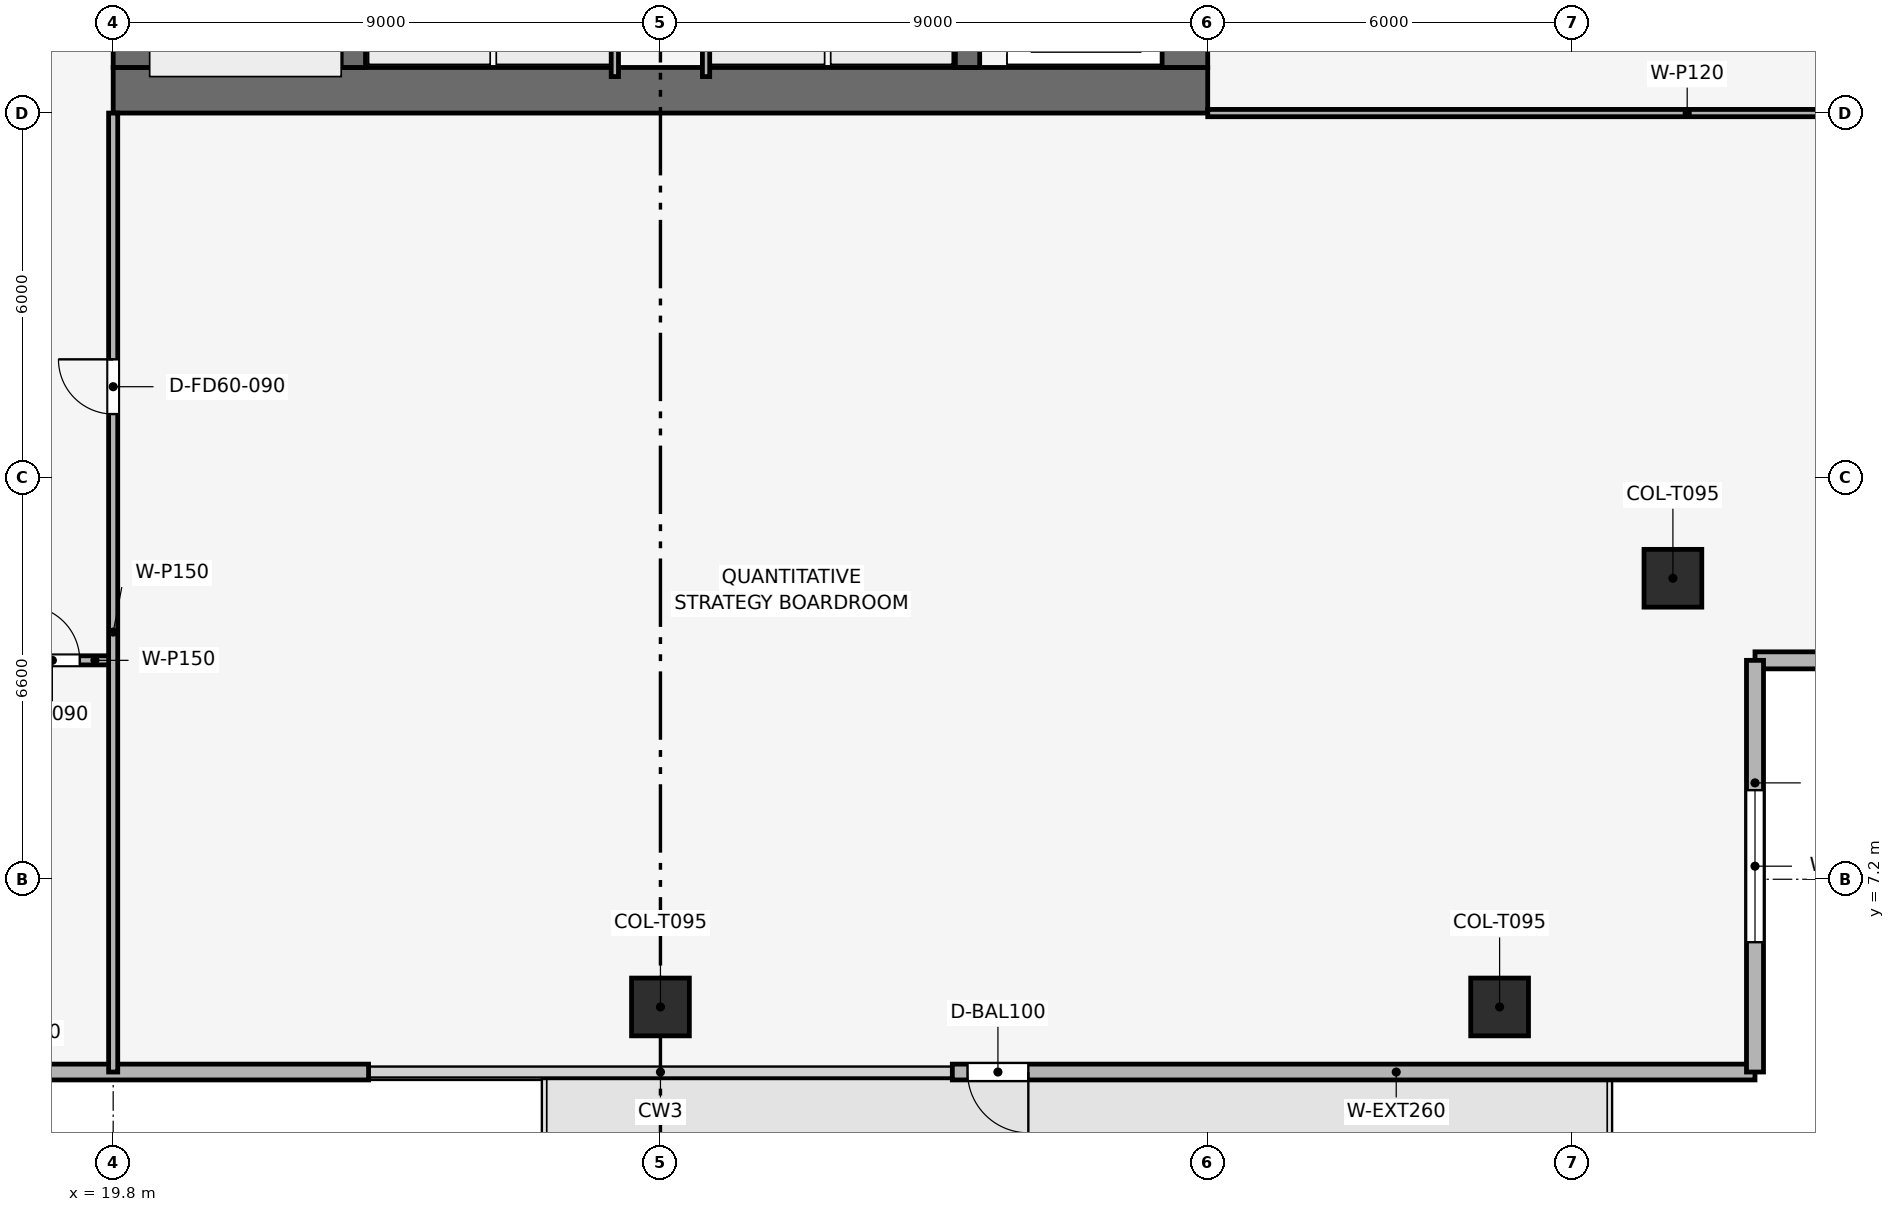
"""IFC4 building model, lengths in metres.
Left out: names, types, materials, properties, quantities, classifications, styles, units other than length and angle.
Written with IfcOpenShell. Run it as: python <this file> out.ifc"""

import sys

from ifc_helpers import new_model, si_unit, direction, frame, frame_2d, origin, origin_2d, place, context, subcontext, project, spatial, rectangle, extrude, element, fill, save


model = new_model("IFC4")
c1 = context("Model", 3, precision=1e-05, world=origin(), true_north=direction((0.0, 1.0)))
c2 = subcontext(c1, "Body", "Model", "MODEL_VIEW")
j1 = project(units=[si_unit("LENGTHUNIT", "METRE"), si_unit("PLANEANGLEUNIT", "RADIAN")], contexts=[c1])
p1 = place(None, origin())
s1 = spatial("IfcSite", under=j1, at=p1, CompositionType="ELEMENT")
p2 = place(p1, origin())
s2 = spatial("IfcBuilding", under=s1, at=p2, CompositionType="ELEMENT")
p3 = place(p2, frame((0.0, 0.0, 261.6)))
s3 = spatial("IfcBuildingStorey", under=s2, at=p3, CompositionType="ELEMENT", Elevation=261.6)
p4 = place(p3, frame((19.8, 20.175, 0.0), z_axis=(0.0, 0.0, 1.0), x_axis=(1.0, 0.0, 0.0)))
e1 = element("IfcWall", 1, at=p4, inside=s3, PredefinedType="SHEAR", context=c2, shape_type="SweptSolid", body=[
    extrude(rectangle(XDim=18.0, YDim=0.75, at=frame_2d((9.0, 0.0))), origin(), (0.0, 0.0, 1.0), 3.75),
])
p5 = place(p3, frame((20.175, 20.55, 0.0), z_axis=(0.0, 0.0, 1.0), x_axis=(0.0, 1.0, 0.0)))
e2 = element("IfcWall", 2, at=p5, inside=s3, PredefinedType="SHEAR", context=c2, shape_type="SweptSolid", body=[
    extrude(rectangle(XDim=16.5, YDim=0.75, at=frame_2d((8.25, 0.0))), origin(), (0.0, 0.0, 1.0), 3.75),
])
p6 = place(p5, frame((10.25, 0.0, 0.0)))
e3 = element("IfcOpeningElement", 3, at=p6, cuts=e2, PredefinedType="OPENING", context=c2, shape_type="SweptSolid", body=[
    extrude(rectangle(XDim=1.1, YDim=2.15, at=frame_2d((0.55, 1.075))), frame((0.0, 0.385, 0.0), z_axis=(0.0, -1.0, 0.0), x_axis=(1.0, 0.0, 0.0)), (0.0, 0.0, 1.0), 0.77),
])
p7 = place(p3, frame((37.425, 20.55, 0.0), z_axis=(0.0, 0.0, 1.0), x_axis=(0.0, 1.0, 0.0)))
e4 = element("IfcWall", 4, at=p7, inside=s3, PredefinedType="SHEAR", context=c2, shape_type="SweptSolid", body=[
    extrude(rectangle(XDim=16.5, YDim=0.75, at=frame_2d((8.25, 0.0))), origin(), (0.0, 0.0, 1.0), 3.75),
])
p8 = place(p7, frame((4.75, 0.0, 0.0)))
e5 = element("IfcOpeningElement", 5, at=p8, cuts=e4, PredefinedType="OPENING", context=c2, shape_type="SweptSolid", body=[
    extrude(rectangle(XDim=1.1, YDim=2.15, at=frame_2d((0.55, 1.075))), frame((0.0, 0.385, 0.0), z_axis=(0.0, -1.0, 0.0), x_axis=(1.0, 0.0, 0.0)), (0.0, 0.0, 1.0), 0.77),
])
for number, where, z_axis, x_axis in (
    (6, (23.75, 20.55, 0.0), (0.0, 0.0, 1.0), (0.0, 1.0, 0.0)),
    (7, (33.85, 20.55, 0.0), (0.0, 0.0, 1.0), (0.0, 1.0, 0.0)),
):
    element("IfcWall", number, at=place(p3, frame(where, z_axis=z_axis, x_axis=x_axis)), inside=s3, PredefinedType="SHEAR", context=c2, shape_type="SweptSolid", body=[
        extrude(rectangle(XDim=16.5, YDim=0.4, at=frame_2d((8.25, 0.0))), origin(), (0.0, 0.0, 1.0), 3.75),
    ])
for number, where, z_axis, x_axis in (
    (8, (28.8, 5.1, 0.003), (0.0, 0.0, 1.0), (1.0, 0.0, 0.0)),
    (9, (42.6, 5.1, 0.003), (0.0, 0.0, 1.0), (1.0, 0.0, 0.0)),
    (10, (45.45, 12.15, 0.003), (0.0, 0.0, 1.0), (1.0, 0.0, 0.0)),
):
    element("IfcColumn", number, at=place(p3, frame(where, z_axis=z_axis, x_axis=x_axis)), inside=s3, PredefinedType="COLUMN", context=c2, shape_type="SweptSolid", body=[
        extrude(rectangle(XDim=0.95, YDim=0.95, at=origin_2d()), origin(), (0.0, 0.0, 1.0), 3.494),
    ])
p9 = place(p3, frame((46.8, 4.03, 0.0), z_axis=(0.0, 0.0, 1.0), x_axis=(-1.0, 0.0, 0.0)))
e11 = element("IfcWall", 11, at=p9, inside=s3, PredefinedType="SOLIDWALL", context=c2, shape_type="SweptSolid", body=[
    extrude(rectangle(XDim=13.2, YDim=0.26, at=frame_2d((6.6, 0.0))), origin(), (0.0, 0.0, 1.0), 3.5),
])
p10 = place(p9, frame((11.95, 0.0, 0.0)))
e12 = element("IfcOpeningElement", 12, at=p10, cuts=e11, PredefinedType="OPENING", context=c2, shape_type="SweptSolid", body=[
    extrude(rectangle(XDim=1.0, YDim=2.2, at=frame_2d((0.5, 1.1))), frame((0.0, 0.14, 0.0), z_axis=(0.0, -1.0, 0.0), x_axis=(1.0, 0.0, 0.0)), (0.0, 0.0, 1.0), 0.28),
])
p11 = place(p3, frame((24.0, 4.03, 0.0), z_axis=(0.0, 0.0, 1.0), x_axis=(-1.0, 0.0, 0.0)))
e13 = element("IfcWall", 13, at=p11, inside=s3, PredefinedType="SOLIDWALL", context=c2, shape_type="SweptSolid", body=[
    extrude(rectangle(XDim=13.2, YDim=0.26, at=frame_2d((6.6, 0.0))), origin(), (0.0, 0.0, 1.0), 3.5),
])
p12 = place(p11, frame((11.75, 0.0, 0.9)))
e14 = element("IfcOpeningElement", 14, at=p12, cuts=e13, PredefinedType="OPENING", context=c2, shape_type="SweptSolid", body=[
    extrude(rectangle(XDim=1.2, YDim=2.1, at=frame_2d((0.6, 1.05))), frame((0.0, 0.14, 0.0), z_axis=(0.0, -1.0, 0.0), x_axis=(1.0, 0.0, 0.0)), (0.0, 0.0, 1.0), 0.28),
])
p13 = place(p3, frame((53.57, 10.8, 0.0), z_axis=(0.0, 0.0, 1.0), x_axis=(-1.0, 0.0, 0.0)))
e15 = element("IfcWall", 15, at=p13, inside=s3, PredefinedType="SOLIDWALL", context=c2, shape_type="SweptSolid", body=[
    extrude(rectangle(XDim=6.77, YDim=0.28, at=frame_2d((3.385, 0.0))), origin(), (0.0, 0.0, 1.0), 3.5),
])
p14 = place(p13, frame((2.135, 0.0, 0.9)))
e16 = element("IfcOpeningElement", 16, at=p14, cuts=e15, PredefinedType="OPENING", context=c2, shape_type="SweptSolid", body=[
    extrude(rectangle(XDim=2.5, YDim=1.9, at=frame_2d((1.25, 0.95))), frame((0.0, 0.15, 0.0), z_axis=(0.0, -1.0, 0.0), x_axis=(1.0, 0.0, 0.0)), (0.0, 0.0, 1.0), 0.3),
])
p15 = place(p3, frame((46.8, 10.8, 0.0), z_axis=(0.0, 0.0, 1.0), x_axis=(0.0, -1.0, 0.0)))
e17 = element("IfcWall", 17, at=p15, inside=s3, PredefinedType="SOLIDWALL", context=c2, shape_type="SweptSolid", body=[
    extrude(rectangle(XDim=6.77, YDim=0.28, at=frame_2d((3.385, 0.0))), origin(), (0.0, 0.0, 1.0), 3.5),
])
p16 = place(p15, frame((2.135, 0.0, 0.9)))
e18 = element("IfcOpeningElement", 18, at=p16, cuts=e17, PredefinedType="OPENING", context=c2, shape_type="SweptSolid", body=[
    extrude(rectangle(XDim=2.5, YDim=1.9, at=frame_2d((1.25, 0.95))), frame((0.0, 0.15, 0.0), z_axis=(0.0, -1.0, 0.0), x_axis=(1.0, 0.0, 0.0)), (0.0, 0.0, 1.0), 0.3),
])
for number, where, z_axis, x_axis in (
    (19, (28.05, 20.4, 0.0), (0.0, 0.0, 1.0), (0.0, 1.0, 0.0)),
    (20, (29.55, 20.4, 0.0), (0.0, 0.0, 1.0), (0.0, 1.0, 0.0)),
):
    element("IfcWall", number, at=place(p3, frame(where, z_axis=z_axis, x_axis=x_axis)), inside=s3, PredefinedType="PARTITIONING", context=c2, shape_type="SweptSolid", body=[
        extrude(rectangle(XDim=2.75, YDim=0.12, at=frame_2d((1.375, 0.0))), origin(), (0.0, 0.0, 1.0), 3.5),
    ])
p17 = place(p3, frame((17.9, 10.8, 0.0), z_axis=(0.0, 0.0, 1.0), x_axis=(1.0, 0.0, 0.0)))
e21 = element("IfcWall", 21, at=p17, inside=s3, PredefinedType="PARTITIONING", context=c2, shape_type="SweptSolid", body=[
    extrude(rectangle(XDim=1.9, YDim=0.15, at=frame_2d((0.95, 0.0))), origin(), (0.0, 0.0, 1.0), 3.5),
])
p18 = place(p17, frame((0.45, 0.0, 0.0)))
e22 = element("IfcOpeningElement", 22, at=p18, cuts=e21, PredefinedType="OPENING", context=c2, shape_type="SweptSolid", body=[
    extrude(rectangle(XDim=0.9, YDim=2.1, at=frame_2d((0.45, 1.05))), frame((0.0, 0.085, 0.0), z_axis=(0.0, -1.0, 0.0), x_axis=(1.0, 0.0, 0.0)), (0.0, 0.0, 1.0), 0.17),
])
p19 = place(p3, frame((19.8, 4.03, 0.0), z_axis=(0.0, 0.0, 1.0), x_axis=(0.0, 1.0, 0.0)))
e23 = element("IfcWall", 23, at=p19, inside=s3, PredefinedType="PARTITIONING", context=c2, shape_type="SweptSolid", body=[
    extrude(rectangle(XDim=15.77, YDim=0.15, at=frame_2d((7.885, 0.0))), origin(), (0.0, 0.0, 1.0), 3.085),
])
p20 = place(p19, frame((10.82, 0.0, 0.0)))
e24 = element("IfcOpeningElement", 24, at=p20, cuts=e23, PredefinedType="OPENING", context=c2, shape_type="SweptSolid", body=[
    extrude(rectangle(XDim=0.9, YDim=2.1, at=frame_2d((0.45, 1.05))), frame((0.0, 0.085, 0.0), z_axis=(0.0, -1.0, 0.0), x_axis=(1.0, 0.0, 0.0)), (0.0, 0.0, 1.0), 0.17),
])
p21 = place(p3, frame((37.8, 19.8, 0.0), z_axis=(0.0, 0.0, 1.0), x_axis=(1.0, 0.0, 0.0)))
e25 = element("IfcWall", 25, at=p21, inside=s3, PredefinedType="PARTITIONING", context=c2, shape_type="SweptSolid", body=[
    extrude(rectangle(XDim=15.77, YDim=0.12, at=frame_2d((7.885, 0.0))), origin(), (0.0, 0.0, 1.0), 3.085),
])
p22 = place(p10, origin())
e26 = element("IfcDoor", 26, at=p22, inside=s3, OperationType="SINGLE_SWING_LEFT", PredefinedType="DOOR", context=c2, shape_type="SweptSolid", body=[
    extrude(rectangle(XDim=1.0, YDim=2.2, at=frame_2d((0.5, 1.1))), frame((0.0, 0.025, 0.0), z_axis=(0.0, -1.0, 0.0), x_axis=(1.0, 0.0, 0.0)), (0.0, 0.0, 1.0), 0.05),
])
fill(e12, e26)
p23 = place(p16, origin())
e27 = element("IfcWindow", 27, at=p23, inside=s3, PartitioningType="SINGLE_PANEL", PredefinedType="WINDOW", context=c2, shape_type="SweptSolid", body=[
    extrude(rectangle(XDim=2.5, YDim=1.9, at=frame_2d((1.25, 0.95))), frame((0.0, 0.03, 0.0), z_axis=(0.0, -1.0, 0.0), x_axis=(1.0, 0.0, 0.0)), (0.0, 0.0, 1.0), 0.06),
])
fill(e18, e27)
p24 = place(p18, origin())
e28 = element("IfcDoor", 28, at=p24, inside=s3, OperationType="SINGLE_SWING_LEFT", PredefinedType="DOOR", context=c2, shape_type="SweptSolid", body=[
    extrude(rectangle(XDim=0.9, YDim=2.1, at=frame_2d((0.45, 1.05))), frame((0.0, 0.025, 0.0), z_axis=(0.0, -1.0, 0.0), x_axis=(1.0, 0.0, 0.0)), (0.0, 0.0, 1.0), 0.05),
])
fill(e22, e28)
p25 = place(p20, origin())
e29 = element("IfcDoor", 29, at=p25, inside=s3, OperationType="SINGLE_SWING_RIGHT", PredefinedType="DOOR", context=c2, shape_type="SweptSolid", body=[
    extrude(rectangle(XDim=0.9, YDim=2.1, at=frame_2d((0.45, 1.05))), frame((0.0, 0.025, 0.0), z_axis=(0.0, -1.0, 0.0), x_axis=(1.0, 0.0, 0.0)), (0.0, 0.0, 1.0), 0.05),
])
fill(e24, e29)
save(model, sys.argv[1])
